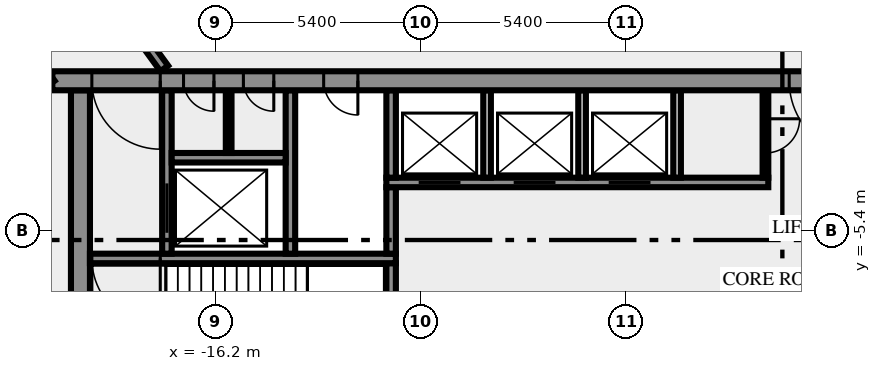
"""IFC4 building model, lengths in metres.
Left out: names, types, materials, properties, quantities, classifications, styles, units other than length and angle.
Written with IfcOpenShell. Run it as: python <this file> out.ifc"""

import sys

from ifc_helpers import new_model, si_unit, direction, frame, frame_2d, origin, place, context, subcontext, project, spatial, rectangle, extrude, element, fill, save


model = new_model("IFC4")
c1 = context("Model", 3, precision=1e-05, world=origin(), true_north=direction((0.0, 1.0)))
c2 = subcontext(c1, "Body", "Model", "MODEL_VIEW")
j1 = project(units=[si_unit("LENGTHUNIT", "METRE"), si_unit("PLANEANGLEUNIT", "RADIAN")], contexts=[c1])
p1 = place(None, origin())
s1 = spatial("IfcSite", under=j1, at=p1, CompositionType="ELEMENT")
p2 = place(p1, origin())
s2 = spatial("IfcBuilding", under=s1, at=p2, CompositionType="ELEMENT")
p3 = place(p2, frame((0.0, 0.0, 6.0)))
s3 = spatial("IfcBuildingStorey", under=s2, at=p3, CompositionType="ELEMENT", Elevation=6.0)
p4 = place(p3, frame((-19.75, -10.5, 0.0), z_axis=(0.0, 0.0, 1.0), x_axis=(0.0, 1.0, 0.0)))
e1 = element("IfcWall", 1, at=p4, inside=s3, PredefinedType="SHEAR", context=c2, shape_type="SweptSolid", body=[
    extrude(rectangle(XDim=8.8, YDim=0.5, at=frame_2d((4.4, 0.0))), origin(), (0.0, 0.0, 1.0), 5.1),
])
p5 = place(p3, frame((-11.575, -7.25, 0.0), z_axis=(0.0, 0.0, 1.0), x_axis=(0.0, 1.0, 0.0)))
e2 = element("IfcWall", 2, at=p5, inside=s3, PredefinedType="SHEAR", context=c2, shape_type="SweptSolid", body=[
    extrude(rectangle(XDim=1.0, YDim=0.25, at=frame_2d((0.5, 0.0))), origin(), (0.0, 0.0, 1.0), 5.1),
])
p6 = place(p3, frame((-11.45, -6.125, 0.0), z_axis=(0.0, 0.0, 1.0), x_axis=(-1.0, 0.0, 0.0)))
e3 = element("IfcWall", 3, at=p6, inside=s3, PredefinedType="SHEAR", context=c2, shape_type="SweptSolid", body=[
    extrude(rectangle(XDim=8.05, YDim=0.25, at=frame_2d((4.025, 0.0))), origin(), (0.0, 0.0, 1.0), 5.1),
])
p7 = place(p6, frame((6.2, 0.0, 0.0)))
e4 = element("IfcOpeningElement", 4, at=p7, cuts=e3, PredefinedType="OPENING", context=c2, shape_type="SweptSolid", body=[
    extrude(rectangle(XDim=1.8, YDim=2.1, at=frame_2d((0.9, 1.05))), frame((0.0, 0.135, 0.0), z_axis=(0.0, -1.0, 0.0), x_axis=(1.0, 0.0, 0.0)), (0.0, 0.0, 1.0), 0.27),
])
p8 = place(p3, frame((-17.475, -6.0, 0.0), z_axis=(0.0, 0.0, 1.0), x_axis=(0.0, 1.0, 0.0)))
e5 = element("IfcWall", 5, at=p8, inside=s3, PredefinedType="SHEAR", context=c2, shape_type="SweptSolid", body=[
    extrude(rectangle(XDim=4.3, YDim=0.25, at=frame_2d((2.15, 0.0))), origin(), (0.0, 0.0, 1.0), 5.1),
])
p9 = place(p8, frame((0.55, 0.0, 0.0)))
e6 = element("IfcOpeningElement", 6, at=p9, cuts=e5, PredefinedType="OPENING", context=c2, shape_type="SweptSolid", body=[
    extrude(rectangle(XDim=1.3, YDim=2.1, at=frame_2d((0.65, 1.05))), frame((0.0, 0.135, 0.0), z_axis=(0.0, -1.0, 0.0), x_axis=(1.0, 0.0, 0.0)), (0.0, 0.0, 1.0), 0.27),
])
p10 = place(p3, frame((-14.225, -6.0, 0.0), z_axis=(0.0, 0.0, 1.0), x_axis=(0.0, 1.0, 0.0)))
e7 = element("IfcWall", 7, at=p10, inside=s3, PredefinedType="SHEAR", context=c2, shape_type="SweptSolid", body=[
    extrude(rectangle(XDim=4.3, YDim=0.25, at=frame_2d((2.15, 0.0))), origin(), (0.0, 0.0, 1.0), 5.1),
])
p11 = place(p3, frame((-11.575, -6.0, 0.0), z_axis=(0.0, 0.0, 1.0), x_axis=(0.0, 1.0, 0.0)))
e8 = element("IfcWall", 8, at=p11, inside=s3, PredefinedType="SHEAR", context=c2, shape_type="SweptSolid", body=[
    extrude(rectangle(XDim=1.75, YDim=0.25, at=frame_2d((0.875, 0.0))), origin(), (0.0, 0.0, 1.0), 5.1),
])
p12 = place(p3, frame((-11.7, -4.125, 0.0), z_axis=(0.0, 0.0, 1.0), x_axis=(1.0, 0.0, 0.0)))
e9 = element("IfcWall", 9, at=p12, inside=s3, PredefinedType="SHEAR", context=c2, shape_type="SweptSolid", body=[
    extrude(rectangle(XDim=10.05, YDim=0.25, at=frame_2d((5.025, 0.0))), origin(), (0.0, 0.0, 1.0), 5.1),
])
p13 = place(p12, frame((0.85, 0.0, 0.0)))
e10 = element("IfcOpeningElement", 10, at=p13, cuts=e9, PredefinedType="OPENING", context=c2, shape_type="SweptSolid", body=[
    extrude(rectangle(XDim=1.1, YDim=2.1, at=frame_2d((0.55, 1.05))), frame((0.0, 0.135, 0.0), z_axis=(0.0, -1.0, 0.0), x_axis=(1.0, 0.0, 0.0)), (0.0, 0.0, 1.0), 0.27),
])
p14 = place(p12, frame((3.35, 0.0, 0.0)))
e11 = element("IfcOpeningElement", 11, at=p14, cuts=e9, PredefinedType="OPENING", context=c2, shape_type="SweptSolid", body=[
    extrude(rectangle(XDim=1.1, YDim=2.1, at=frame_2d((0.55, 1.05))), frame((0.0, 0.135, 0.0), z_axis=(0.0, -1.0, 0.0), x_axis=(1.0, 0.0, 0.0)), (0.0, 0.0, 1.0), 0.27),
])
p15 = place(p12, frame((5.85, 0.0, 0.0)))
e12 = element("IfcOpeningElement", 12, at=p15, cuts=e9, PredefinedType="OPENING", context=c2, shape_type="SweptSolid", body=[
    extrude(rectangle(XDim=1.1, YDim=2.1, at=frame_2d((0.55, 1.05))), frame((0.0, 0.135, 0.0), z_axis=(0.0, -1.0, 0.0), x_axis=(1.0, 0.0, 0.0)), (0.0, 0.0, 1.0), 0.27),
])
p16 = place(p3, frame((-11.575, -4.0, 0.0), z_axis=(0.0, 0.0, 1.0), x_axis=(0.0, 1.0, 0.0)))
e13 = element("IfcWall", 13, at=p16, inside=s3, PredefinedType="SHEAR", context=c2, shape_type="SweptSolid", body=[
    extrude(rectangle(XDim=2.3, YDim=0.25, at=frame_2d((1.15, 0.0))), origin(), (0.0, 0.0, 1.0), 5.1),
])
for number, where, z_axis, x_axis in (
    (14, (-9.05, -4.0, 0.0), (0.0, 0.0, 1.0), (0.0, 1.0, 0.0)),
    (15, (-6.55, -4.0, 0.0), (0.0, 0.0, 1.0), (0.0, 1.0, 0.0)),
    (16, (-4.05, -4.0, 0.0), (0.0, 0.0, 1.0), (0.0, 1.0, 0.0)),
):
    element("IfcWall", number, at=place(p3, frame(where, z_axis=z_axis, x_axis=x_axis)), inside=s3, PredefinedType="SOLIDWALL", context=c2, shape_type="SweptSolid", body=[
        extrude(rectangle(XDim=2.3, YDim=0.2, at=frame_2d((1.15, 0.0))), origin(), (0.0, 0.0, 1.0), 5.1),
    ])
p17 = place(p3, frame((-1.725, -1.7, 0.0), z_axis=(0.0, 0.0, 1.0), x_axis=(0.0, -1.0, 0.0)))
e17 = element("IfcWall", 17, at=p17, inside=s3, PredefinedType="PARTITIONING", context=c2, shape_type="SweptSolid", body=[
    extrude(rectangle(XDim=2.3, YDim=0.15, at=frame_2d((1.15, 0.0))), origin(), (0.0, 0.0, 1.0), 5.1),
])
p18 = place(p17, frame((0.75, 0.0, 0.0)))
e18 = element("IfcOpeningElement", 18, at=p18, cuts=e17, PredefinedType="OPENING", context=c2, shape_type="SweptSolid", body=[
    extrude(rectangle(XDim=0.9, YDim=2.1, at=frame_2d((0.45, 1.05))), frame((0.0, 0.085, 0.0), z_axis=(0.0, -1.0, 0.0), x_axis=(1.0, 0.0, 0.0)), (0.0, 0.0, 1.0), 0.17),
])
p19 = place(p3, frame((-17.35, -3.475, 0.0), z_axis=(0.0, 0.0, 1.0), x_axis=(1.0, 0.0, 0.0)))
e19 = element("IfcWall", 19, at=p19, inside=s3, PredefinedType="SHEAR", context=c2, shape_type="SweptSolid", body=[
    extrude(rectangle(XDim=3.0, YDim=0.25, at=frame_2d((1.5, 0.0))), origin(), (0.0, 0.0, 1.0), 5.1),
])
p20 = place(p3, frame((-15.85, -3.35, 0.0), z_axis=(0.0, 0.0, 1.0), x_axis=(0.0, 1.0, 0.0)))
e20 = element("IfcWall", 20, at=p20, inside=s3, PredefinedType="PARTITIONING", context=c2, shape_type="SweptSolid", body=[
    extrude(rectangle(XDim=1.65, YDim=0.15, at=frame_2d((0.825, 0.0))), origin(), (0.0, 0.0, 1.0), 5.1),
])
p21 = place(p3, frame((20.49, -1.45, 0.0), z_axis=(0.0, 0.0, 1.0), x_axis=(-1.0, 0.0, 0.0)))
e21 = element("IfcWall", 21, at=p21, inside=s3, PredefinedType="SHEAR", context=c2, shape_type="SweptSolid", body=[
    extrude(rectangle(XDim=40.98, YDim=0.5, at=frame_2d((20.49, 0.0))), origin(), (0.0, 0.0, 1.0), 5.1),
])
p22 = place(p21, frame((38.14, 0.0, 0.0)))
e22 = element("IfcOpeningElement", 22, at=p22, cuts=e21, PredefinedType="OPENING", context=c2, shape_type="SweptSolid", body=[
    extrude(rectangle(XDim=1.8, YDim=2.1, at=frame_2d((0.9, 1.05))), frame((0.0, 0.26, 0.0), z_axis=(0.0, -1.0, 0.0), x_axis=(1.0, 0.0, 0.0)), (0.0, 0.0, 1.0), 0.52),
])
p23 = place(p21, frame((36.728, 0.0, 0.0)))
e23 = element("IfcOpeningElement", 23, at=p23, cuts=e21, PredefinedType="OPENING", context=c2, shape_type="SweptSolid", body=[
    extrude(rectangle(XDim=0.8, YDim=2.1, at=frame_2d((0.4, 1.05))), frame((0.0, 0.26, 0.0), z_axis=(0.0, -1.0, 0.0), x_axis=(1.0, 0.0, 0.0)), (0.0, 0.0, 1.0), 0.52),
])
p24 = place(p21, frame((35.153, 0.0, 0.0)))
e24 = element("IfcOpeningElement", 24, at=p24, cuts=e21, PredefinedType="OPENING", context=c2, shape_type="SweptSolid", body=[
    extrude(rectangle(XDim=0.8, YDim=2.1, at=frame_2d((0.4, 1.05))), frame((0.0, 0.26, 0.0), z_axis=(0.0, -1.0, 0.0), x_axis=(1.0, 0.0, 0.0)), (0.0, 0.0, 1.0), 0.52),
])
p25 = place(p21, frame((32.94, 0.0, 0.0)))
e25 = element("IfcOpeningElement", 25, at=p25, cuts=e21, PredefinedType="OPENING", context=c2, shape_type="SweptSolid", body=[
    extrude(rectangle(XDim=0.9, YDim=2.1, at=frame_2d((0.45, 1.05))), frame((0.0, 0.26, 0.0), z_axis=(0.0, -1.0, 0.0), x_axis=(1.0, 0.0, 0.0)), (0.0, 0.0, 1.0), 0.52),
])
p26 = place(p21, frame((19.59, 0.0, 0.0)))
e26 = element("IfcOpeningElement", 26, at=p26, cuts=e21, PredefinedType="OPENING", context=c2, shape_type="SweptSolid", body=[
    extrude(rectangle(XDim=2.0, YDim=2.1, at=frame_2d((1.0, 1.05))), frame((0.0, 0.26, 0.0), z_axis=(0.0, -1.0, 0.0), x_axis=(1.0, 0.0, 0.0)), (0.0, 0.0, 1.0), 0.52),
])
p27 = place(p21, frame((7.14, 0.0, 0.0)))
e27 = element("IfcOpeningElement", 27, at=p27, cuts=e21, PredefinedType="OPENING", context=c2, shape_type="SweptSolid", body=[
    extrude(rectangle(XDim=0.9, YDim=2.1, at=frame_2d((0.45, 1.05))), frame((0.0, 0.26, 0.0), z_axis=(0.0, -1.0, 0.0), x_axis=(1.0, 0.0, 0.0)), (0.0, 0.0, 1.0), 0.52),
])
p28 = place(p21, frame((4.19, 0.0, 0.0)))
e28 = element("IfcOpeningElement", 28, at=p28, cuts=e21, PredefinedType="OPENING", context=c2, shape_type="SweptSolid", body=[
    extrude(rectangle(XDim=0.9, YDim=2.1, at=frame_2d((0.45, 1.05))), frame((0.0, 0.26, 0.0), z_axis=(0.0, -1.0, 0.0), x_axis=(1.0, 0.0, 0.0)), (0.0, 0.0, 1.0), 0.52),
])
p29 = place(p21, frame((1.04, 0.0, 0.0)))
e29 = element("IfcOpeningElement", 29, at=p29, cuts=e21, PredefinedType="OPENING", context=c2, shape_type="SweptSolid", body=[
    extrude(rectangle(XDim=1.8, YDim=2.1, at=frame_2d((0.9, 1.05))), frame((0.0, 0.26, 0.0), z_axis=(0.0, -1.0, 0.0), x_axis=(1.0, 0.0, 0.0)), (0.0, 0.0, 1.0), 0.52),
])
p30 = place(p3, frame((-20.531, -1.523, 0.0), z_axis=(0.0, 0.0, 1.0), x_axis=(-0.587784522481, 0.809017524614, 0.0)))
e30 = element("IfcWall", 30, at=p30, inside=s3, PredefinedType="SOLIDWALL", context=c2, shape_type="SweptSolid", body=[
    extrude(rectangle(XDim=49.912, YDim=0.25, at=frame_2d((24.956, 0.0))), origin(), (0.0, 0.0, 1.0), 5.1),
])
p31 = place(p30, frame((48.57, 0.0, 0.0)))
e31 = element("IfcOpeningElement", 31, at=p31, cuts=e30, PredefinedType="OPENING", context=c2, shape_type="SweptSolid", body=[
    extrude(rectangle(XDim=0.9, YDim=2.1, at=frame_2d((0.45, 1.05))), frame((0.0, 0.135, 0.0), z_axis=(0.0, -1.0, 0.0), x_axis=(1.0, 0.0, 0.0)), (0.0, 0.0, 1.0), 0.27),
])
p32 = place(p30, frame((10.516, 0.0, 0.0)))
e32 = element("IfcOpeningElement", 32, at=p32, cuts=e30, PredefinedType="OPENING", context=c2, shape_type="SweptSolid", body=[
    extrude(rectangle(XDim=0.9, YDim=2.1, at=frame_2d((0.45, 1.05))), frame((0.0, 0.135, 0.0), z_axis=(0.0, -1.0, 0.0), x_axis=(1.0, 0.0, 0.0)), (0.0, 0.0, 1.0), 0.27),
])
p33 = place(p30, frame((23.766, 0.0, 0.0)))
e33 = element("IfcOpeningElement", 33, at=p33, cuts=e30, PredefinedType="OPENING", context=c2, shape_type="SweptSolid", body=[
    extrude(rectangle(XDim=0.9, YDim=2.1, at=frame_2d((0.45, 1.05))), frame((0.0, 0.135, 0.0), z_axis=(0.0, -1.0, 0.0), x_axis=(1.0, 0.0, 0.0)), (0.0, 0.0, 1.0), 0.27),
])
p34 = place(p30, frame((8.916, 0.0, 0.0)))
e34 = element("IfcOpeningElement", 34, at=p34, cuts=e30, PredefinedType="OPENING", context=c2, shape_type="SweptSolid", body=[
    extrude(rectangle(XDim=0.9, YDim=2.1, at=frame_2d((0.45, 1.05))), frame((0.0, 0.135, 0.0), z_axis=(0.0, -1.0, 0.0), x_axis=(1.0, 0.0, 0.0)), (0.0, 0.0, 1.0), 0.27),
])
p35 = place(p3, frame((-37.232, 25.972, 0.0), z_axis=(0.0, 0.0, 1.0), x_axis=(0.587786323093, -0.809016216391, 0.0)))
e35 = element("IfcWall", 35, at=p35, inside=s3, PredefinedType="SOLIDWALL", context=c2, shape_type="SweptSolid", body=[
    extrude(rectangle(XDim=33.493, YDim=0.25, at=frame_2d((16.747, 0.0))), origin(), (0.0, 0.0, 1.0), 5.1),
])
p36 = place(p35, frame((13.485, 0.0, 0.0)))
e36 = element("IfcOpeningElement", 36, at=p36, cuts=e35, PredefinedType="OPENING", context=c2, shape_type="SweptSolid", body=[
    extrude(rectangle(XDim=0.9, YDim=2.1, at=frame_2d((0.45, 1.05))), frame((0.0, 0.135, 0.0), z_axis=(0.0, -1.0, 0.0), x_axis=(1.0, 0.0, 0.0)), (0.0, 0.0, 1.0), 0.27),
])
p37 = place(p35, frame((15.085, 0.0, 0.0)))
e37 = element("IfcOpeningElement", 37, at=p37, cuts=e35, PredefinedType="OPENING", context=c2, shape_type="SweptSolid", body=[
    extrude(rectangle(XDim=0.9, YDim=2.1, at=frame_2d((0.45, 1.05))), frame((0.0, 0.135, 0.0), z_axis=(0.0, -1.0, 0.0), x_axis=(1.0, 0.0, 0.0)), (0.0, 0.0, 1.0), 0.27),
])
p38 = place(p7, origin())
e38 = element("IfcDoor", 38, at=p38, inside=s3, OperationType="DOUBLE_DOOR_SINGLE_SWING", PredefinedType="DOOR", context=c2, shape_type="SweptSolid", body=[
    extrude(rectangle(XDim=1.8, YDim=2.1, at=frame_2d((0.9, 1.05))), frame((0.0, 0.025, 0.0), z_axis=(0.0, -1.0, 0.0), x_axis=(1.0, 0.0, 0.0)), (0.0, 0.0, 1.0), 0.05),
])
fill(e4, e38)
p39 = place(p9, origin())
e39 = element("IfcDoor", 39, at=p39, inside=s3, OperationType="DOUBLE_DOOR_SLIDING", PredefinedType="DOOR", context=c2, shape_type="SweptSolid", body=[
    extrude(rectangle(XDim=1.3, YDim=2.1, at=frame_2d((0.65, 1.05))), frame((0.0, 0.025, 0.0), z_axis=(0.0, -1.0, 0.0), x_axis=(1.0, 0.0, 0.0)), (0.0, 0.0, 1.0), 0.05),
])
fill(e6, e39)
p40 = place(p13, origin())
e40 = element("IfcDoor", 40, at=p40, inside=s3, OperationType="DOUBLE_DOOR_SLIDING", PredefinedType="DOOR", context=c2, shape_type="SweptSolid", body=[
    extrude(rectangle(XDim=1.1, YDim=2.1, at=frame_2d((0.55, 1.05))), frame((0.0, 0.025, 0.0), z_axis=(0.0, -1.0, 0.0), x_axis=(1.0, 0.0, 0.0)), (0.0, 0.0, 1.0), 0.05),
])
fill(e10, e40)
p41 = place(p14, origin())
e41 = element("IfcDoor", 41, at=p41, inside=s3, OperationType="DOUBLE_DOOR_SLIDING", PredefinedType="DOOR", context=c2, shape_type="SweptSolid", body=[
    extrude(rectangle(XDim=1.1, YDim=2.1, at=frame_2d((0.55, 1.05))), frame((0.0, 0.025, 0.0), z_axis=(0.0, -1.0, 0.0), x_axis=(1.0, 0.0, 0.0)), (0.0, 0.0, 1.0), 0.05),
])
fill(e11, e41)
p42 = place(p15, origin())
e42 = element("IfcDoor", 42, at=p42, inside=s3, OperationType="DOUBLE_DOOR_SLIDING", PredefinedType="DOOR", context=c2, shape_type="SweptSolid", body=[
    extrude(rectangle(XDim=1.1, YDim=2.1, at=frame_2d((0.55, 1.05))), frame((0.0, 0.025, 0.0), z_axis=(0.0, -1.0, 0.0), x_axis=(1.0, 0.0, 0.0)), (0.0, 0.0, 1.0), 0.05),
])
fill(e12, e42)
p43 = place(p18, origin())
e43 = element("IfcDoor", 43, at=p43, inside=s3, OperationType="SINGLE_SWING_RIGHT", PredefinedType="DOOR", context=c2, shape_type="SweptSolid", body=[
    extrude(rectangle(XDim=0.9, YDim=2.1, at=frame_2d((0.45, 1.05))), frame((0.0, 0.025, 0.0), z_axis=(0.0, -1.0, 0.0), x_axis=(1.0, 0.0, 0.0)), (0.0, 0.0, 1.0), 0.05),
])
fill(e18, e43)
p44 = place(p22, origin())
e44 = element("IfcDoor", 44, at=p44, inside=s3, OperationType="DOUBLE_DOOR_SINGLE_SWING", PredefinedType="DOOR", context=c2, shape_type="SweptSolid", body=[
    extrude(rectangle(XDim=1.8, YDim=2.1, at=frame_2d((0.9, 1.05))), frame((0.0, 0.025, 0.0), z_axis=(0.0, -1.0, 0.0), x_axis=(1.0, 0.0, 0.0)), (0.0, 0.0, 1.0), 0.05),
])
fill(e22, e44)
p45 = place(p23, origin())
e45 = element("IfcDoor", 45, at=p45, inside=s3, OperationType="SINGLE_SWING_RIGHT", PredefinedType="DOOR", context=c2, shape_type="SweptSolid", body=[
    extrude(rectangle(XDim=0.8, YDim=2.1, at=frame_2d((0.4, 1.05))), frame((0.0, 0.025, 0.0), z_axis=(0.0, -1.0, 0.0), x_axis=(1.0, 0.0, 0.0)), (0.0, 0.0, 1.0), 0.05),
])
fill(e23, e45)
p46 = place(p24, origin())
e46 = element("IfcDoor", 46, at=p46, inside=s3, OperationType="SINGLE_SWING_RIGHT", PredefinedType="DOOR", context=c2, shape_type="SweptSolid", body=[
    extrude(rectangle(XDim=0.8, YDim=2.1, at=frame_2d((0.4, 1.05))), frame((0.0, 0.025, 0.0), z_axis=(0.0, -1.0, 0.0), x_axis=(1.0, 0.0, 0.0)), (0.0, 0.0, 1.0), 0.05),
])
fill(e24, e46)
p47 = place(p25, origin())
e47 = element("IfcDoor", 47, at=p47, inside=s3, OperationType="SINGLE_SWING_RIGHT", PredefinedType="DOOR", context=c2, shape_type="SweptSolid", body=[
    extrude(rectangle(XDim=0.9, YDim=2.1, at=frame_2d((0.45, 1.05))), frame((0.0, 0.025, 0.0), z_axis=(0.0, -1.0, 0.0), x_axis=(1.0, 0.0, 0.0)), (0.0, 0.0, 1.0), 0.05),
])
fill(e25, e47)
p48 = place(p26, origin())
e48 = element("IfcDoor", 48, at=p48, inside=s3, OperationType="DOUBLE_DOOR_SINGLE_SWING", PredefinedType="DOOR", context=c2, shape_type="SweptSolid", body=[
    extrude(rectangle(XDim=2.0, YDim=2.1, at=frame_2d((1.0, 1.05))), frame((0.0, 0.025, 0.0), z_axis=(0.0, -1.0, 0.0), x_axis=(1.0, 0.0, 0.0)), (0.0, 0.0, 1.0), 0.05),
])
fill(e26, e48)
save(model, sys.argv[1])
